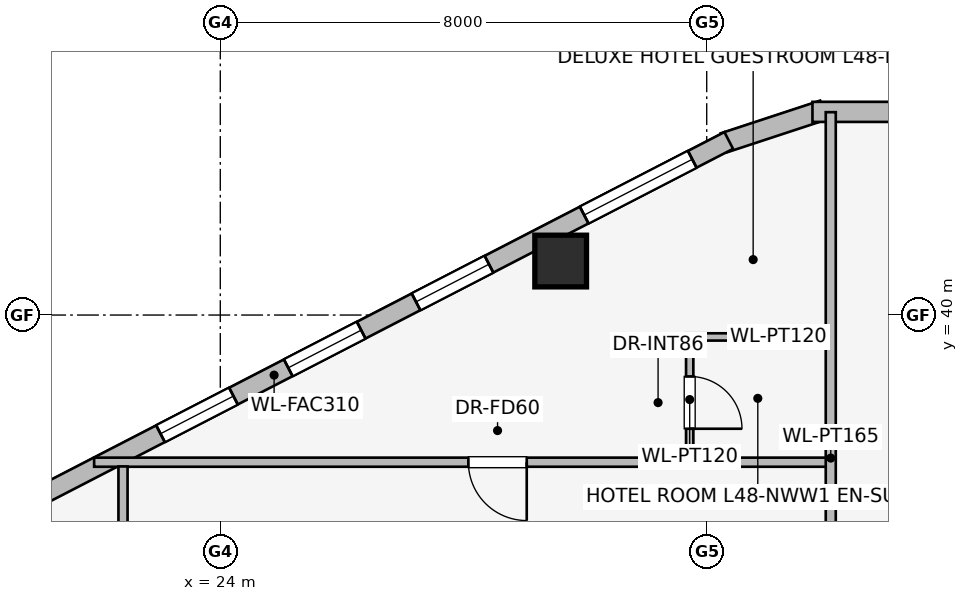
"""IFC4 building model, lengths in metres.
Left out: names, types, materials, properties, quantities, classifications, styles, units other than length and angle.
Written with IfcOpenShell. Run it as: python <this file> out.ifc"""

import sys

from ifc_helpers import new_model, si_unit, direction, frame, frame_2d, origin, origin_2d, place, context, subcontext, project, spatial, rectangle, extrude, element, fill, save


model = new_model("IFC4")
c1 = context("Model", 3, precision=1e-05, world=origin(), true_north=direction((0.0, 1.0)))
c2 = subcontext(c1, "Body", "Model", "MODEL_VIEW")
j1 = project(units=[si_unit("LENGTHUNIT", "METRE"), si_unit("PLANEANGLEUNIT", "RADIAN")], contexts=[c1])
p1 = place(None, origin())
s1 = spatial("IfcSite", under=j1, at=p1, CompositionType="ELEMENT")
p2 = place(p1, origin())
s2 = spatial("IfcBuilding", under=s1, at=p2, CompositionType="ELEMENT")
p3 = place(p2, frame((0.0, 0.0, 177.45)))
s3 = spatial("IfcBuildingStorey", under=s2, at=p3, CompositionType="ELEMENT", Elevation=177.45)
p4 = place(p3, frame((29.598, 40.888, 0.0), z_axis=(0.0, 0.0, 1.0), x_axis=(1.0, 0.0, 0.0)))
e1 = element("IfcColumn", 1, at=p4, inside=s3, PredefinedType="COLUMN", context=c2, shape_type="SweptSolid", body=[
    extrude(rectangle(XDim=0.85, YDim=0.85, at=origin_2d()), origin(), (0.0, 0.0, 1.0), 3.45),
])
p5 = place(p3, frame((32.281, 42.832, 0.0), z_axis=(0.0, 0.0, 1.0), x_axis=(0.949937416267, 0.312440242569, 0.0)))
e2 = element("IfcWall", 2, at=p5, inside=s3, PredefinedType="STANDARD", context=c2, shape_type="SweptSolid", body=[
    extrude(rectangle(XDim=1.722, YDim=0.33, at=frame_2d((0.861, 0.0))), origin(), (0.0, 0.0, 1.0), 3.16),
])
p6 = place(p3, frame((33.739, 43.341, 0.0), z_axis=(0.0, 0.0, 1.0), x_axis=(1.0, 0.0, 0.0)))
e3 = element("IfcWall", 3, at=p6, inside=s3, PredefinedType="STANDARD", context=c2, shape_type="SweptSolid", body=[
    extrude(rectangle(XDim=1.722, YDim=0.33, at=frame_2d((0.861, 0.0))), origin(), (0.0, 0.0, 1.0), 3.16),
])
p7 = place(p3, frame((17.408, 35.153, 0.0), z_axis=(0.0, 0.0, 1.0), x_axis=(0.888626188278, 0.458632202867, 0.0)))
e4 = element("IfcWall", 4, at=p7, inside=s3, PredefinedType="STANDARD", context=c2, shape_type="SweptSolid", body=[
    extrude(rectangle(XDim=16.828, YDim=0.31, at=frame_2d((8.414, 0.0))), origin(), (0.0, 0.0, 1.0), 3.16),
])
p8 = place(p7, frame((0.675, 0.0, 0.75)))
e5 = element("IfcOpeningElement", 5, at=p8, cuts=e4, PredefinedType="OPENING", context=c2, shape_type="SweptSolid", body=[
    extrude(rectangle(XDim=2.0, YDim=1.5, at=frame_2d((1.0, 0.75))), frame((0.0, 0.165, 0.0), z_axis=(0.0, -1.0, 0.0), x_axis=(1.0, 0.0, 0.0)), (0.0, 0.0, 1.0), 0.33),
])
p9 = place(p7, frame((6.312, 0.0, 0.75)))
e6 = element("IfcOpeningElement", 6, at=p9, cuts=e4, PredefinedType="OPENING", context=c2, shape_type="SweptSolid", body=[
    extrude(rectangle(XDim=1.35, YDim=1.45, at=frame_2d((0.675, 0.725))), frame((0.0, 0.165, 0.0), z_axis=(0.0, -1.0, 0.0), x_axis=(1.0, 0.0, 0.0)), (0.0, 0.0, 1.0), 0.33),
])
p10 = place(p7, frame((8.676, 0.0, 0.75)))
e7 = element("IfcOpeningElement", 7, at=p10, cuts=e4, PredefinedType="OPENING", context=c2, shape_type="SweptSolid", body=[
    extrude(rectangle(XDim=1.35, YDim=1.45, at=frame_2d((0.675, 0.725))), frame((0.0, 0.165, 0.0), z_axis=(0.0, -1.0, 0.0), x_axis=(1.0, 0.0, 0.0)), (0.0, 0.0, 1.0), 0.33),
])
p11 = place(p7, frame((11.041, 0.0, 0.75)))
e8 = element("IfcOpeningElement", 8, at=p11, cuts=e4, PredefinedType="OPENING", context=c2, shape_type="SweptSolid", body=[
    extrude(rectangle(XDim=1.35, YDim=1.45, at=frame_2d((0.675, 0.725))), frame((0.0, 0.165, 0.0), z_axis=(0.0, -1.0, 0.0), x_axis=(1.0, 0.0, 0.0)), (0.0, 0.0, 1.0), 0.33),
])
p12 = place(p7, frame((14.153, 0.0, 0.75)))
e9 = element("IfcOpeningElement", 9, at=p12, cuts=e4, PredefinedType="OPENING", context=c2, shape_type="SweptSolid", body=[
    extrude(rectangle(XDim=2.0, YDim=1.5, at=frame_2d((1.0, 0.75))), frame((0.0, 0.165, 0.0), z_axis=(0.0, -1.0, 0.0), x_axis=(1.0, 0.0, 0.0)), (0.0, 0.0, 1.0), 0.33),
])
p13 = place(p3, frame((34.0, 39.64, 0.0), z_axis=(0.0, 0.0, 1.0), x_axis=(-1.0, 0.0, 0.0)))
e10 = element("IfcWall", 10, at=p13, inside=s3, PredefinedType="PARTITIONING", context=c2, shape_type="SweptSolid", body=[
    extrude(rectangle(XDim=2.34, YDim=0.12, at=frame_2d((1.17, 0.0))), origin(), (0.0, 0.0, 1.0), 3.16),
])
p14 = place(p3, frame((31.72, 39.64, 0.0), z_axis=(0.0, 0.0, 1.0), x_axis=(0.0, -1.0, 0.0)))
e11 = element("IfcWall", 11, at=p14, inside=s3, PredefinedType="PARTITIONING", context=c2, shape_type="SweptSolid", body=[
    extrude(rectangle(XDim=2.06, YDim=0.12, at=frame_2d((1.03, 0.0))), origin(), (0.0, 0.0, 1.0), 3.16),
])
p15 = place(p14, frame((0.65, 0.0, 0.0)))
e12 = element("IfcOpeningElement", 12, at=p15, cuts=e11, PredefinedType="OPENING", context=c2, shape_type="SweptSolid", body=[
    extrude(rectangle(XDim=0.86, YDim=2.0, at=frame_2d((0.43, 1.0))), frame((0.0, 0.07, 0.0), z_axis=(0.0, -1.0, 0.0), x_axis=(1.0, 0.0, 0.0)), (0.0, 0.0, 1.0), 0.14),
])
p16 = place(p3, frame((34.0, 37.58, 0.0), z_axis=(0.0, 0.0, 1.0), x_axis=(-1.0, 0.0, 0.0)))
e13 = element("IfcWall", 13, at=p16, inside=s3, PredefinedType="PARTITIONING", context=c2, shape_type="SweptSolid", body=[
    extrude(rectangle(XDim=12.075, YDim=0.15, at=frame_2d((6.038, 0.0))), origin(), (0.0, 0.0, 1.0), 3.16),
])
p17 = place(p16, frame((4.96, 0.0, 0.0)))
e14 = element("IfcOpeningElement", 14, at=p17, cuts=e13, PredefinedType="OPENING", context=c2, shape_type="SweptSolid", body=[
    extrude(rectangle(XDim=0.96, YDim=2.0, at=frame_2d((0.48, 1.0))), frame((0.0, 0.085, 0.0), z_axis=(0.0, -1.0, 0.0), x_axis=(1.0, 0.0, 0.0)), (0.0, 0.0, 1.0), 0.17),
])
p18 = place(p3, frame((34.04, 31.96, 0.0), z_axis=(0.0, 0.0, 1.0), x_axis=(0.0, 1.0, 0.0)))
e15 = element("IfcWall", 15, at=p18, inside=s3, PredefinedType="PARTITIONING", context=c2, shape_type="SweptSolid", body=[
    extrude(rectangle(XDim=11.376, YDim=0.165, at=frame_2d((5.688, 0.0))), origin(), (0.0, 0.0, 1.0), 3.16),
])
p19 = place(p3, frame((22.4, 36.08, 0.0), z_axis=(0.0, 0.0, 1.0), x_axis=(0.0, 1.0, 0.0)))
e16 = element("IfcWall", 16, at=p19, inside=s3, PredefinedType="PARTITIONING", context=c2, shape_type="SweptSolid", body=[
    extrude(rectangle(XDim=1.43, YDim=0.15, at=frame_2d((0.715, 0.0))), origin(), (0.0, 0.0, 1.0), 3.16),
])
p20 = place(p9, origin())
e17 = element("IfcWindow", 17, at=p20, inside=s3, PartitioningType="SINGLE_PANEL", PredefinedType="WINDOW", context=c2, shape_type="SweptSolid", body=[
    extrude(rectangle(XDim=1.35, YDim=1.45, at=frame_2d((0.675, 0.725))), frame((0.0, 0.03, 0.0), z_axis=(0.0, -1.0, 0.0), x_axis=(1.0, 0.0, 0.0)), (0.0, 0.0, 1.0), 0.06),
])
fill(e6, e17)
p21 = place(p10, origin())
e18 = element("IfcWindow", 18, at=p21, inside=s3, PartitioningType="SINGLE_PANEL", PredefinedType="WINDOW", context=c2, shape_type="SweptSolid", body=[
    extrude(rectangle(XDim=1.35, YDim=1.45, at=frame_2d((0.675, 0.725))), frame((0.0, 0.03, 0.0), z_axis=(0.0, -1.0, 0.0), x_axis=(1.0, 0.0, 0.0)), (0.0, 0.0, 1.0), 0.06),
])
fill(e7, e18)
p22 = place(p11, origin())
e19 = element("IfcWindow", 19, at=p22, inside=s3, PartitioningType="SINGLE_PANEL", PredefinedType="WINDOW", context=c2, shape_type="SweptSolid", body=[
    extrude(rectangle(XDim=1.35, YDim=1.45, at=frame_2d((0.675, 0.725))), frame((0.0, 0.03, 0.0), z_axis=(0.0, -1.0, 0.0), x_axis=(1.0, 0.0, 0.0)), (0.0, 0.0, 1.0), 0.06),
])
fill(e8, e19)
p23 = place(p12, origin())
e20 = element("IfcWindow", 20, at=p23, inside=s3, PartitioningType="SINGLE_PANEL", PredefinedType="WINDOW", context=c2, shape_type="SweptSolid", body=[
    extrude(rectangle(XDim=2.0, YDim=1.5, at=frame_2d((1.0, 0.75))), frame((0.0, 0.03, 0.0), z_axis=(0.0, -1.0, 0.0), x_axis=(1.0, 0.0, 0.0)), (0.0, 0.0, 1.0), 0.06),
])
fill(e9, e20)
p24 = place(p15, origin())
e21 = element("IfcDoor", 21, at=p24, inside=s3, OperationType="SINGLE_SWING_RIGHT", PredefinedType="DOOR", context=c2, shape_type="SweptSolid", body=[
    extrude(rectangle(XDim=0.86, YDim=2.0, at=frame_2d((0.43, 1.0))), frame((0.0, 0.025, 0.0), z_axis=(0.0, -1.0, 0.0), x_axis=(1.0, 0.0, 0.0)), (0.0, 0.0, 1.0), 0.05),
])
fill(e12, e21)
p25 = place(p17, origin())
e22 = element("IfcDoor", 22, at=p25, inside=s3, OperationType="SINGLE_SWING_LEFT", PredefinedType="DOOR", context=c2, shape_type="SweptSolid", body=[
    extrude(rectangle(XDim=0.96, YDim=2.0, at=frame_2d((0.48, 1.0))), frame((0.0, 0.025, 0.0), z_axis=(0.0, -1.0, 0.0), x_axis=(1.0, 0.0, 0.0)), (0.0, 0.0, 1.0), 0.05),
])
fill(e14, e22)
save(model, sys.argv[1])
